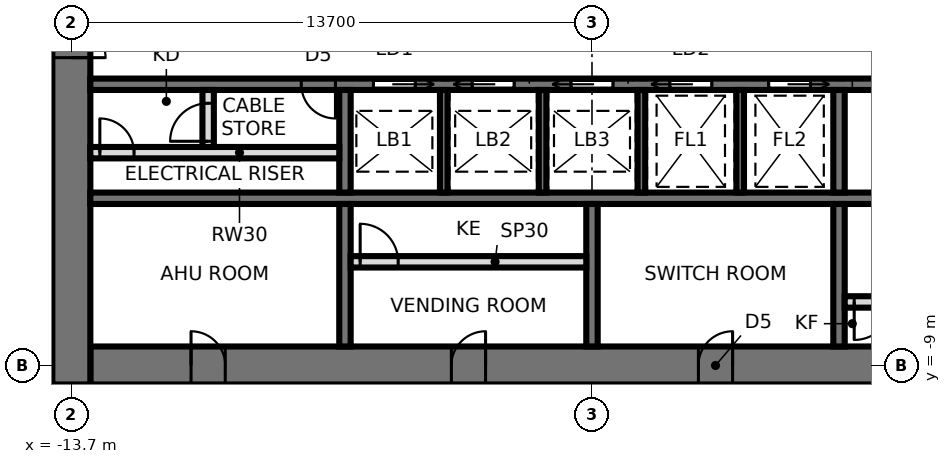
"""IFC4 building model, lengths in metres.
Left out: names, types, materials, properties, quantities, classifications, styles, units other than length and angle.
Written with IfcOpenShell. Run it as: python <this file> out.ifc"""

import sys

from ifc_helpers import new_model, si_unit, direction, frame, frame_2d, origin, place, context, subcontext, project, spatial, rectangle, extrude, element, fill, save


model = new_model("IFC4")
c1 = context("Model", 3, precision=1e-05, world=origin(), true_north=direction((0.0, 1.0)))
c2 = subcontext(c1, "Body", "Model", "MODEL_VIEW")
j1 = project(units=[si_unit("LENGTHUNIT", "METRE"), si_unit("PLANEANGLEUNIT", "RADIAN")], contexts=[c1])
p1 = place(None, origin())
s1 = spatial("IfcSite", under=j1, at=p1, CompositionType="ELEMENT")
p2 = place(p1, origin())
s2 = spatial("IfcBuilding", under=s1, at=p2, CompositionType="ELEMENT")
p3 = place(p2, frame((0.0, 0.0, 154.8)))
s3 = spatial("IfcBuildingStorey", under=s2, at=p3, CompositionType="ELEMENT", Elevation=154.8)
p4 = place(p3, frame((-13.2, -9.0, 0.0), z_axis=(0.0, 0.0, 1.0), x_axis=(1.0, 0.0, 0.0)))
e1 = element("IfcWall", 1, at=p4, inside=s3, PredefinedType="SHEAR", context=c2, shape_type="SweptSolid", body=[
    extrude(rectangle(XDim=26.4, YDim=1.0, at=frame_2d((13.2, 0.0))), origin(), (0.0, 0.0, 1.0), 3.9),
])
p5 = place(p4, frame((2.65, 0.0, 0.0)))
e2 = element("IfcOpeningElement", 2, at=p5, cuts=e1, PredefinedType="OPENING", context=c2, shape_type="SweptSolid", body=[
    extrude(rectangle(XDim=0.9, YDim=2.1, at=frame_2d((0.45, 1.05))), frame((0.0, 0.51, 0.0), z_axis=(0.0, -1.0, 0.0), x_axis=(1.0, 0.0, 0.0)), (0.0, 0.0, 1.0), 1.02),
])
p6 = place(p4, frame((9.5, 0.0, 0.0)))
e3 = element("IfcOpeningElement", 3, at=p6, cuts=e1, PredefinedType="OPENING", context=c2, shape_type="SweptSolid", body=[
    extrude(rectangle(XDim=0.9, YDim=2.1, at=frame_2d((0.45, 1.05))), frame((0.0, 0.51, 0.0), z_axis=(0.0, -1.0, 0.0), x_axis=(1.0, 0.0, 0.0)), (0.0, 0.0, 1.0), 1.02),
])
p7 = place(p4, frame((16.0, 0.0, 0.0)))
e4 = element("IfcOpeningElement", 4, at=p7, cuts=e1, PredefinedType="OPENING", context=c2, shape_type="SweptSolid", body=[
    extrude(rectangle(XDim=0.9, YDim=2.1, at=frame_2d((0.45, 1.05))), frame((0.0, 0.51, 0.0), z_axis=(0.0, -1.0, 0.0), x_axis=(1.0, 0.0, 0.0)), (0.0, 0.0, 1.0), 1.02),
])
p8 = place(p4, frame((22.85, 0.0, 0.0)))
e5 = element("IfcOpeningElement", 5, at=p8, cuts=e1, PredefinedType="OPENING", context=c2, shape_type="SweptSolid", body=[
    extrude(rectangle(XDim=0.9, YDim=2.1, at=frame_2d((0.45, 1.05))), frame((0.0, 0.51, 0.0), z_axis=(0.0, -1.0, 0.0), x_axis=(1.0, 0.0, 0.0)), (0.0, 0.0, 1.0), 1.02),
])
p9 = place(p3, frame((-13.7, 9.5, 0.0), z_axis=(0.0, 0.0, 1.0), x_axis=(0.0, -1.0, 0.0)))
e6 = element("IfcWall", 6, at=p9, inside=s3, PredefinedType="SHEAR", context=c2, shape_type="SweptSolid", body=[
    extrude(rectangle(XDim=19.0, YDim=1.0, at=frame_2d((9.5, 0.0))), origin(), (0.0, 0.0, 1.0), 3.9),
])
p10 = place(p9, frame((8.6, 0.0, 0.0)))
e7 = element("IfcOpeningElement", 7, at=p10, cuts=e6, PredefinedType="OPENING", context=c2, shape_type="SweptSolid", body=[
    extrude(rectangle(XDim=1.8, YDim=2.4, at=frame_2d((0.9, 1.2))), frame((0.0, 0.51, 0.0), z_axis=(0.0, -1.0, 0.0), x_axis=(1.0, 0.0, 0.0)), (0.0, 0.0, 1.0), 1.02),
])
p11 = place(p3, frame((-13.2, -1.6, 0.0), z_axis=(0.0, 0.0, 1.0), x_axis=(1.0, 0.0, 0.0)))
e8 = element("IfcWall", 8, at=p11, inside=s3, PredefinedType="SHEAR", context=c2, shape_type="SweptSolid", body=[
    extrude(rectangle(XDim=26.4, YDim=0.3, at=frame_2d((13.2, 0.0))), origin(), (0.0, 0.0, 1.0), 3.9),
])
p12 = place(p11, frame((25.15, 0.0, 0.0)))
e9 = element("IfcOpeningElement", 9, at=p12, cuts=e8, PredefinedType="OPENING", context=c2, shape_type="SweptSolid", body=[
    extrude(rectangle(XDim=1.0, YDim=2.1, at=frame_2d((0.5, 1.05))), frame((0.0, 0.16, 0.0), z_axis=(0.0, -1.0, 0.0), x_axis=(1.0, 0.0, 0.0)), (0.0, 0.0, 1.0), 0.32),
])
p13 = place(p11, frame((7.45, 0.0, 0.0)))
e10 = element("IfcOpeningElement", 10, at=p13, cuts=e8, PredefinedType="OPENING", context=c2, shape_type="SweptSolid", body=[
    extrude(rectangle(XDim=1.1, YDim=2.3, at=frame_2d((0.55, 1.15))), frame((0.0, 0.16, 0.0), z_axis=(0.0, -1.0, 0.0), x_axis=(1.0, 0.0, 0.0)), (0.0, 0.0, 1.0), 0.32),
])
p14 = place(p11, frame((10.05, 0.0, 0.0)))
e11 = element("IfcOpeningElement", 11, at=p14, cuts=e8, PredefinedType="OPENING", context=c2, shape_type="SweptSolid", body=[
    extrude(rectangle(XDim=1.1, YDim=2.3, at=frame_2d((0.55, 1.15))), frame((0.0, 0.16, 0.0), z_axis=(0.0, -1.0, 0.0), x_axis=(1.0, 0.0, 0.0)), (0.0, 0.0, 1.0), 0.32),
])
p15 = place(p11, frame((12.65, 0.0, 0.0)))
e12 = element("IfcOpeningElement", 12, at=p15, cuts=e8, PredefinedType="OPENING", context=c2, shape_type="SweptSolid", body=[
    extrude(rectangle(XDim=1.1, YDim=2.3, at=frame_2d((0.55, 1.15))), frame((0.0, 0.16, 0.0), z_axis=(0.0, -1.0, 0.0), x_axis=(1.0, 0.0, 0.0)), (0.0, 0.0, 1.0), 0.32),
])
p16 = place(p11, frame((15.25, 0.0, 0.0)))
e13 = element("IfcOpeningElement", 13, at=p16, cuts=e8, PredefinedType="OPENING", context=c2, shape_type="SweptSolid", body=[
    extrude(rectangle(XDim=1.1, YDim=2.3, at=frame_2d((0.55, 1.15))), frame((0.0, 0.16, 0.0), z_axis=(0.0, -1.0, 0.0), x_axis=(1.0, 0.0, 0.0)), (0.0, 0.0, 1.0), 0.32),
])
p17 = place(p11, frame((17.85, 0.0, 0.0)))
e14 = element("IfcOpeningElement", 14, at=p17, cuts=e8, PredefinedType="OPENING", context=c2, shape_type="SweptSolid", body=[
    extrude(rectangle(XDim=1.1, YDim=2.3, at=frame_2d((0.55, 1.15))), frame((0.0, 0.16, 0.0), z_axis=(0.0, -1.0, 0.0), x_axis=(1.0, 0.0, 0.0)), (0.0, 0.0, 1.0), 0.32),
])
p18 = place(p11, frame((5.55, 0.0, 0.0)))
e15 = element("IfcOpeningElement", 15, at=p18, cuts=e8, PredefinedType="OPENING", context=c2, shape_type="SweptSolid", body=[
    extrude(rectangle(XDim=0.9, YDim=2.1, at=frame_2d((0.45, 1.05))), frame((0.0, 0.16, 0.0), z_axis=(0.0, -1.0, 0.0), x_axis=(1.0, 0.0, 0.0)), (0.0, 0.0, 1.0), 0.32),
])
p19 = place(p3, frame((-13.2, -4.6, 0.0), z_axis=(0.0, 0.0, 1.0), x_axis=(1.0, 0.0, 0.0)))
e16 = element("IfcWall", 16, at=p19, inside=s3, PredefinedType="SHEAR", context=c2, shape_type="SweptSolid", body=[
    extrude(rectangle(XDim=26.4, YDim=0.3, at=frame_2d((13.2, 0.0))), origin(), (0.0, 0.0, 1.0), 3.9),
])
p20 = place(p3, frame((-6.5, -1.75, 0.0), z_axis=(0.0, 0.0, 1.0), x_axis=(0.0, -1.0, 0.0)))
e17 = element("IfcWall", 17, at=p20, inside=s3, PredefinedType="SHEAR", context=c2, shape_type="SweptSolid", body=[
    extrude(rectangle(XDim=2.7, YDim=0.3, at=frame_2d((1.35, 0.0))), origin(), (0.0, 0.0, 1.0), 3.9),
])
p21 = place(p3, frame((-6.5, -4.75, 0.0), z_axis=(0.0, 0.0, 1.0), x_axis=(0.0, -1.0, 0.0)))
e18 = element("IfcWall", 18, at=p21, inside=s3, PredefinedType="SHEAR", context=c2, shape_type="SweptSolid", body=[
    extrude(rectangle(XDim=3.75, YDim=0.3, at=frame_2d((1.875, 0.0))), origin(), (0.0, 0.0, 1.0), 3.9),
])
p22 = place(p3, frame((6.5, -1.75, 0.0), z_axis=(0.0, 0.0, 1.0), x_axis=(0.0, -1.0, 0.0)))
e19 = element("IfcWall", 19, at=p22, inside=s3, PredefinedType="SHEAR", context=c2, shape_type="SweptSolid", body=[
    extrude(rectangle(XDim=2.7, YDim=0.3, at=frame_2d((1.35, 0.0))), origin(), (0.0, 0.0, 1.0), 3.9),
])
p23 = place(p3, frame((6.5, -4.75, 0.0), z_axis=(0.0, 0.0, 1.0), x_axis=(0.0, -1.0, 0.0)))
e20 = element("IfcWall", 20, at=p23, inside=s3, PredefinedType="SHEAR", context=c2, shape_type="SweptSolid", body=[
    extrude(rectangle(XDim=3.75, YDim=0.3, at=frame_2d((1.875, 0.0))), origin(), (0.0, 0.0, 1.0), 3.9),
])
for number, where, z_axis, x_axis in (
    (21, (-3.9, -1.75, 0.0), (0.0, 0.0, 1.0), (0.0, -1.0, 0.0)),
    (22, (-1.3, -1.75, 0.0), (0.0, 0.0, 1.0), (0.0, -1.0, 0.0)),
    (23, (1.3, -1.75, 0.0), (0.0, 0.0, 1.0), (0.0, -1.0, 0.0)),
    (24, (3.9, -1.75, 0.0), (0.0, 0.0, 1.0), (0.0, -1.0, 0.0)),
):
    element("IfcWall", number, at=place(p3, frame(where, z_axis=z_axis, x_axis=x_axis)), inside=s3, PredefinedType="SHEAR", context=c2, shape_type="SweptSolid", body=[
        extrude(rectangle(XDim=2.7, YDim=0.2, at=frame_2d((1.35, 0.0))), origin(), (0.0, 0.0, 1.0), 3.9),
    ])
p24 = place(p3, frame((0.0, -4.75, 0.0), z_axis=(0.0, 0.0, 1.0), x_axis=(0.0, -1.0, 0.0)))
e25 = element("IfcWall", 25, at=p24, inside=s3, PredefinedType="SHEAR", context=c2, shape_type="SweptSolid", body=[
    extrude(rectangle(XDim=3.75, YDim=0.3, at=frame_2d((1.875, 0.0))), origin(), (0.0, 0.0, 1.0), 3.9),
])
p25 = place(p3, frame((-6.35, -6.272, 0.0), z_axis=(0.0, 0.0, 1.0), x_axis=(1.0, 0.0, 0.0)))
e26 = element("IfcWall", 26, at=p25, inside=s3, PredefinedType="PARTITIONING", context=c2, shape_type="SweptSolid", body=[
    extrude(rectangle(XDim=6.2, YDim=0.3, at=frame_2d((3.1, 0.0))), origin(), (0.0, 0.0, 1.0), 3.74),
])
p26 = place(p25, frame((0.25, 0.0, 0.0)))
e27 = element("IfcOpeningElement", 27, at=p26, cuts=e26, PredefinedType="OPENING", context=c2, shape_type="SweptSolid", body=[
    extrude(rectangle(XDim=1.0, YDim=2.4, at=frame_2d((0.5, 1.2))), frame((0.0, 0.16, 0.0), z_axis=(0.0, -1.0, 0.0), x_axis=(1.0, 0.0, 0.0)), (0.0, 0.0, 1.0), 0.32),
])
p27 = place(p3, frame((6.65, -7.328, 0.0), z_axis=(0.0, 0.0, 1.0), x_axis=(1.0, 0.0, 0.0)))
e28 = element("IfcWall", 28, at=p27, inside=s3, PredefinedType="PARTITIONING", context=c2, shape_type="SweptSolid", body=[
    extrude(rectangle(XDim=6.55, YDim=0.3, at=frame_2d((3.275, 0.0))), origin(), (0.0, 0.0, 1.0), 3.74),
])
p28 = place(p27, frame((0.25, 0.0, 0.0)))
e29 = element("IfcOpeningElement", 29, at=p28, cuts=e28, PredefinedType="OPENING", context=c2, shape_type="SweptSolid", body=[
    extrude(rectangle(XDim=1.0, YDim=2.4, at=frame_2d((0.5, 1.2))), frame((0.0, 0.16, 0.0), z_axis=(0.0, -1.0, 0.0), x_axis=(1.0, 0.0, 0.0)), (0.0, 0.0, 1.0), 0.32),
])
p29 = place(p3, frame((-13.2, -3.4, 0.0), z_axis=(0.0, 0.0, 1.0), x_axis=(1.0, 0.0, 0.0)))
e30 = element("IfcWall", 30, at=p29, inside=s3, PredefinedType="SOLIDWALL", context=c2, shape_type="SweptSolid", body=[
    extrude(rectangle(XDim=6.55, YDim=0.3, at=frame_2d((3.275, 0.0))), origin(), (0.0, 0.0, 1.0), 3.74),
])
p30 = place(p29, frame((0.25, 0.0, 0.0)))
e31 = element("IfcOpeningElement", 31, at=p30, cuts=e30, PredefinedType="OPENING", context=c2, shape_type="SweptSolid", body=[
    extrude(rectangle(XDim=0.9, YDim=2.1, at=frame_2d((0.45, 1.05))), frame((0.0, 0.16, 0.0), z_axis=(0.0, -1.0, 0.0), x_axis=(1.0, 0.0, 0.0)), (0.0, 0.0, 1.0), 0.32),
])
p31 = place(p3, frame((-10.1, -3.25, 0.0), z_axis=(0.0, 0.0, 1.0), x_axis=(0.0, 1.0, 0.0)))
e32 = element("IfcWall", 32, at=p31, inside=s3, PredefinedType="PARTITIONING", context=c2, shape_type="SweptSolid", body=[
    extrude(rectangle(XDim=1.5, YDim=0.3, at=frame_2d((0.75, 0.0))), origin(), (0.0, 0.0, 1.0), 3.74),
])
p32 = place(p31, frame((0.15, 0.0, 0.0)))
e33 = element("IfcOpeningElement", 33, at=p32, cuts=e32, PredefinedType="OPENING", context=c2, shape_type="SweptSolid", body=[
    extrude(rectangle(XDim=1.0, YDim=2.4, at=frame_2d((0.5, 1.2))), frame((0.0, 0.16, 0.0), z_axis=(0.0, -1.0, 0.0), x_axis=(1.0, 0.0, 0.0)), (0.0, 0.0, 1.0), 0.32),
])
p33 = place(p10, origin())
e34 = element("IfcDoor", 34, at=p33, inside=s3, OperationType="DOUBLE_DOOR_SINGLE_SWING", PredefinedType="DOOR", context=c2, shape_type="SweptSolid", body=[
    extrude(rectangle(XDim=1.72, YDim=2.36, at=frame_2d((0.9, 1.18))), frame((0.0, 0.025, 0.0), z_axis=(0.0, -1.0, 0.0), x_axis=(1.0, 0.0, 0.0)), (0.0, 0.0, 1.0), 0.05),
    extrude(rectangle(XDim=0.04, YDim=2.4, at=frame_2d((0.02, 1.2))), frame((0.0, 0.25, 0.0), z_axis=(0.0, -1.0, 0.0), x_axis=(1.0, 0.0, 0.0)), (0.0, 0.0, 1.0), 0.5),
    extrude(rectangle(XDim=0.04, YDim=2.4, at=frame_2d((1.78, 1.2))), frame((0.0, 0.25, 0.0), z_axis=(0.0, -1.0, 0.0), x_axis=(1.0, 0.0, 0.0)), (0.0, 0.0, 1.0), 0.5),
    extrude(rectangle(XDim=1.72, YDim=0.04, at=frame_2d((0.9, 2.38))), frame((0.0, 0.25, 0.0), z_axis=(0.0, -1.0, 0.0), x_axis=(1.0, 0.0, 0.0)), (0.0, 0.0, 1.0), 0.5),
])
fill(e7, e34)
p34 = place(p13, frame((1.1, 0.0, 0.0), z_axis=(0.0, 0.0, 1.0), x_axis=(-1.0, 0.0, 0.0)))
e35 = element("IfcDoor", 35, at=p34, inside=s3, OperationType="SLIDING_TO_LEFT", PredefinedType="DOOR", context=c2, shape_type="SweptSolid", body=[
    extrude(rectangle(XDim=1.1, YDim=2.3, at=frame_2d((0.55, 1.15))), frame((0.0, 0.025, 0.0), z_axis=(0.0, -1.0, 0.0), x_axis=(1.0, 0.0, 0.0)), (0.0, 0.0, 1.0), 0.05),
])
fill(e10, e35)
p35 = place(p14, frame((1.1, 0.0, 0.0), z_axis=(0.0, 0.0, 1.0), x_axis=(-1.0, 0.0, 0.0)))
e36 = element("IfcDoor", 36, at=p35, inside=s3, OperationType="SLIDING_TO_RIGHT", PredefinedType="DOOR", context=c2, shape_type="SweptSolid", body=[
    extrude(rectangle(XDim=1.1, YDim=2.3, at=frame_2d((0.55, 1.15))), frame((0.0, 0.025, 0.0), z_axis=(0.0, -1.0, 0.0), x_axis=(1.0, 0.0, 0.0)), (0.0, 0.0, 1.0), 0.05),
])
fill(e11, e36)
p36 = place(p15, frame((1.1, 0.0, 0.0), z_axis=(0.0, 0.0, 1.0), x_axis=(-1.0, 0.0, 0.0)))
e37 = element("IfcDoor", 37, at=p36, inside=s3, OperationType="SLIDING_TO_RIGHT", PredefinedType="DOOR", context=c2, shape_type="SweptSolid", body=[
    extrude(rectangle(XDim=1.1, YDim=2.3, at=frame_2d((0.55, 1.15))), frame((0.0, 0.025, 0.0), z_axis=(0.0, -1.0, 0.0), x_axis=(1.0, 0.0, 0.0)), (0.0, 0.0, 1.0), 0.05),
])
fill(e12, e37)
p37 = place(p16, frame((1.1, 0.0, 0.0), z_axis=(0.0, 0.0, 1.0), x_axis=(-1.0, 0.0, 0.0)))
e38 = element("IfcDoor", 38, at=p37, inside=s3, OperationType="SLIDING_TO_RIGHT", PredefinedType="DOOR", context=c2, shape_type="SweptSolid", body=[
    extrude(rectangle(XDim=1.1, YDim=2.3, at=frame_2d((0.55, 1.15))), frame((0.0, 0.025, 0.0), z_axis=(0.0, -1.0, 0.0), x_axis=(1.0, 0.0, 0.0)), (0.0, 0.0, 1.0), 0.05),
])
fill(e13, e38)
p38 = place(p17, frame((1.1, 0.0, 0.0), z_axis=(0.0, 0.0, 1.0), x_axis=(-1.0, 0.0, 0.0)))
e39 = element("IfcDoor", 39, at=p38, inside=s3, OperationType="SLIDING_TO_LEFT", PredefinedType="DOOR", context=c2, shape_type="SweptSolid", body=[
    extrude(rectangle(XDim=1.1, YDim=2.3, at=frame_2d((0.55, 1.15))), frame((0.0, 0.025, 0.0), z_axis=(0.0, -1.0, 0.0), x_axis=(1.0, 0.0, 0.0)), (0.0, 0.0, 1.0), 0.05),
])
fill(e14, e39)
p39 = place(p18, frame((0.9, 0.0, 0.0), z_axis=(0.0, 0.0, 1.0), x_axis=(-1.0, 0.0, 0.0)))
e40 = element("IfcDoor", 40, at=p39, inside=s3, OperationType="SINGLE_SWING_LEFT", PredefinedType="DOOR", context=c2, shape_type="SweptSolid", body=[
    extrude(rectangle(XDim=0.9, YDim=2.1, at=frame_2d((0.45, 1.05))), frame((0.0, 0.025, 0.0), z_axis=(0.0, -1.0, 0.0), x_axis=(1.0, 0.0, 0.0)), (0.0, 0.0, 1.0), 0.05),
])
fill(e15, e40)
p40 = place(p5, origin())
e41 = element("IfcDoor", 41, at=p40, inside=s3, OperationType="SINGLE_SWING_LEFT", PredefinedType="DOOR", context=c2, shape_type="SweptSolid", body=[
    extrude(rectangle(XDim=0.82, YDim=2.06, at=frame_2d((0.45, 1.03))), frame((0.0, 0.025, 0.0), z_axis=(0.0, -1.0, 0.0), x_axis=(1.0, 0.0, 0.0)), (0.0, 0.0, 1.0), 0.05),
    extrude(rectangle(XDim=0.04, YDim=2.1, at=frame_2d((0.02, 1.05))), frame((0.0, 0.25, 0.0), z_axis=(0.0, -1.0, 0.0), x_axis=(1.0, 0.0, 0.0)), (0.0, 0.0, 1.0), 0.5),
    extrude(rectangle(XDim=0.04, YDim=2.1, at=frame_2d((0.88, 1.05))), frame((0.0, 0.25, 0.0), z_axis=(0.0, -1.0, 0.0), x_axis=(1.0, 0.0, 0.0)), (0.0, 0.0, 1.0), 0.5),
    extrude(rectangle(XDim=0.82, YDim=0.04, at=frame_2d((0.45, 2.08))), frame((0.0, 0.25, 0.0), z_axis=(0.0, -1.0, 0.0), x_axis=(1.0, 0.0, 0.0)), (0.0, 0.0, 1.0), 0.5),
])
fill(e2, e41)
p41 = place(p6, origin())
e42 = element("IfcDoor", 42, at=p41, inside=s3, OperationType="SINGLE_SWING_RIGHT", PredefinedType="DOOR", context=c2, shape_type="SweptSolid", body=[
    extrude(rectangle(XDim=0.82, YDim=2.06, at=frame_2d((0.45, 1.03))), frame((0.0, 0.025, 0.0), z_axis=(0.0, -1.0, 0.0), x_axis=(1.0, 0.0, 0.0)), (0.0, 0.0, 1.0), 0.05),
    extrude(rectangle(XDim=0.04, YDim=2.1, at=frame_2d((0.02, 1.05))), frame((0.0, 0.25, 0.0), z_axis=(0.0, -1.0, 0.0), x_axis=(1.0, 0.0, 0.0)), (0.0, 0.0, 1.0), 0.5),
    extrude(rectangle(XDim=0.04, YDim=2.1, at=frame_2d((0.88, 1.05))), frame((0.0, 0.25, 0.0), z_axis=(0.0, -1.0, 0.0), x_axis=(1.0, 0.0, 0.0)), (0.0, 0.0, 1.0), 0.5),
    extrude(rectangle(XDim=0.82, YDim=0.04, at=frame_2d((0.45, 2.08))), frame((0.0, 0.25, 0.0), z_axis=(0.0, -1.0, 0.0), x_axis=(1.0, 0.0, 0.0)), (0.0, 0.0, 1.0), 0.5),
])
fill(e3, e42)
p42 = place(p7, origin())
e43 = element("IfcDoor", 43, at=p42, inside=s3, OperationType="SINGLE_SWING_RIGHT", PredefinedType="DOOR", context=c2, shape_type="SweptSolid", body=[
    extrude(rectangle(XDim=0.82, YDim=2.06, at=frame_2d((0.45, 1.03))), frame((0.0, 0.025, 0.0), z_axis=(0.0, -1.0, 0.0), x_axis=(1.0, 0.0, 0.0)), (0.0, 0.0, 1.0), 0.05),
    extrude(rectangle(XDim=0.04, YDim=2.1, at=frame_2d((0.02, 1.05))), frame((0.0, 0.25, 0.0), z_axis=(0.0, -1.0, 0.0), x_axis=(1.0, 0.0, 0.0)), (0.0, 0.0, 1.0), 0.5),
    extrude(rectangle(XDim=0.04, YDim=2.1, at=frame_2d((0.88, 1.05))), frame((0.0, 0.25, 0.0), z_axis=(0.0, -1.0, 0.0), x_axis=(1.0, 0.0, 0.0)), (0.0, 0.0, 1.0), 0.5),
    extrude(rectangle(XDim=0.82, YDim=0.04, at=frame_2d((0.45, 2.08))), frame((0.0, 0.25, 0.0), z_axis=(0.0, -1.0, 0.0), x_axis=(1.0, 0.0, 0.0)), (0.0, 0.0, 1.0), 0.5),
])
fill(e4, e43)
p43 = place(p26, origin())
e44 = element("IfcDoor", 44, at=p43, inside=s3, OperationType="SINGLE_SWING_LEFT", PredefinedType="DOOR", context=c2, shape_type="SweptSolid", body=[
    extrude(rectangle(XDim=1.0, YDim=2.4, at=frame_2d((0.5, 1.2))), frame((0.0, 0.025, 0.0), z_axis=(0.0, -1.0, 0.0), x_axis=(1.0, 0.0, 0.0)), (0.0, 0.0, 1.0), 0.05),
])
fill(e27, e44)
p44 = place(p28, frame((1.0, 0.0, 0.0), z_axis=(0.0, 0.0, 1.0), x_axis=(-1.0, 0.0, 0.0)))
e45 = element("IfcDoor", 45, at=p44, inside=s3, OperationType="SINGLE_SWING_RIGHT", PredefinedType="DOOR", context=c2, shape_type="SweptSolid", body=[
    extrude(rectangle(XDim=1.0, YDim=2.4, at=frame_2d((0.5, 1.2))), frame((0.0, 0.025, 0.0), z_axis=(0.0, -1.0, 0.0), x_axis=(1.0, 0.0, 0.0)), (0.0, 0.0, 1.0), 0.05),
])
fill(e29, e45)
p45 = place(p30, origin())
e46 = element("IfcDoor", 46, at=p45, inside=s3, OperationType="SINGLE_SWING_LEFT", PredefinedType="DOOR", context=c2, shape_type="SweptSolid", body=[
    extrude(rectangle(XDim=0.9, YDim=2.1, at=frame_2d((0.45, 1.05))), frame((0.0, 0.025, 0.0), z_axis=(0.0, -1.0, 0.0), x_axis=(1.0, 0.0, 0.0)), (0.0, 0.0, 1.0), 0.05),
])
fill(e31, e46)
p46 = place(p32, origin())
e47 = element("IfcDoor", 47, at=p46, inside=s3, OperationType="SINGLE_SWING_LEFT", PredefinedType="DOOR", context=c2, shape_type="SweptSolid", body=[
    extrude(rectangle(XDim=1.0, YDim=2.4, at=frame_2d((0.5, 1.2))), frame((0.0, 0.025, 0.0), z_axis=(0.0, -1.0, 0.0), x_axis=(1.0, 0.0, 0.0)), (0.0, 0.0, 1.0), 0.05),
])
fill(e33, e47)
save(model, sys.argv[1])
